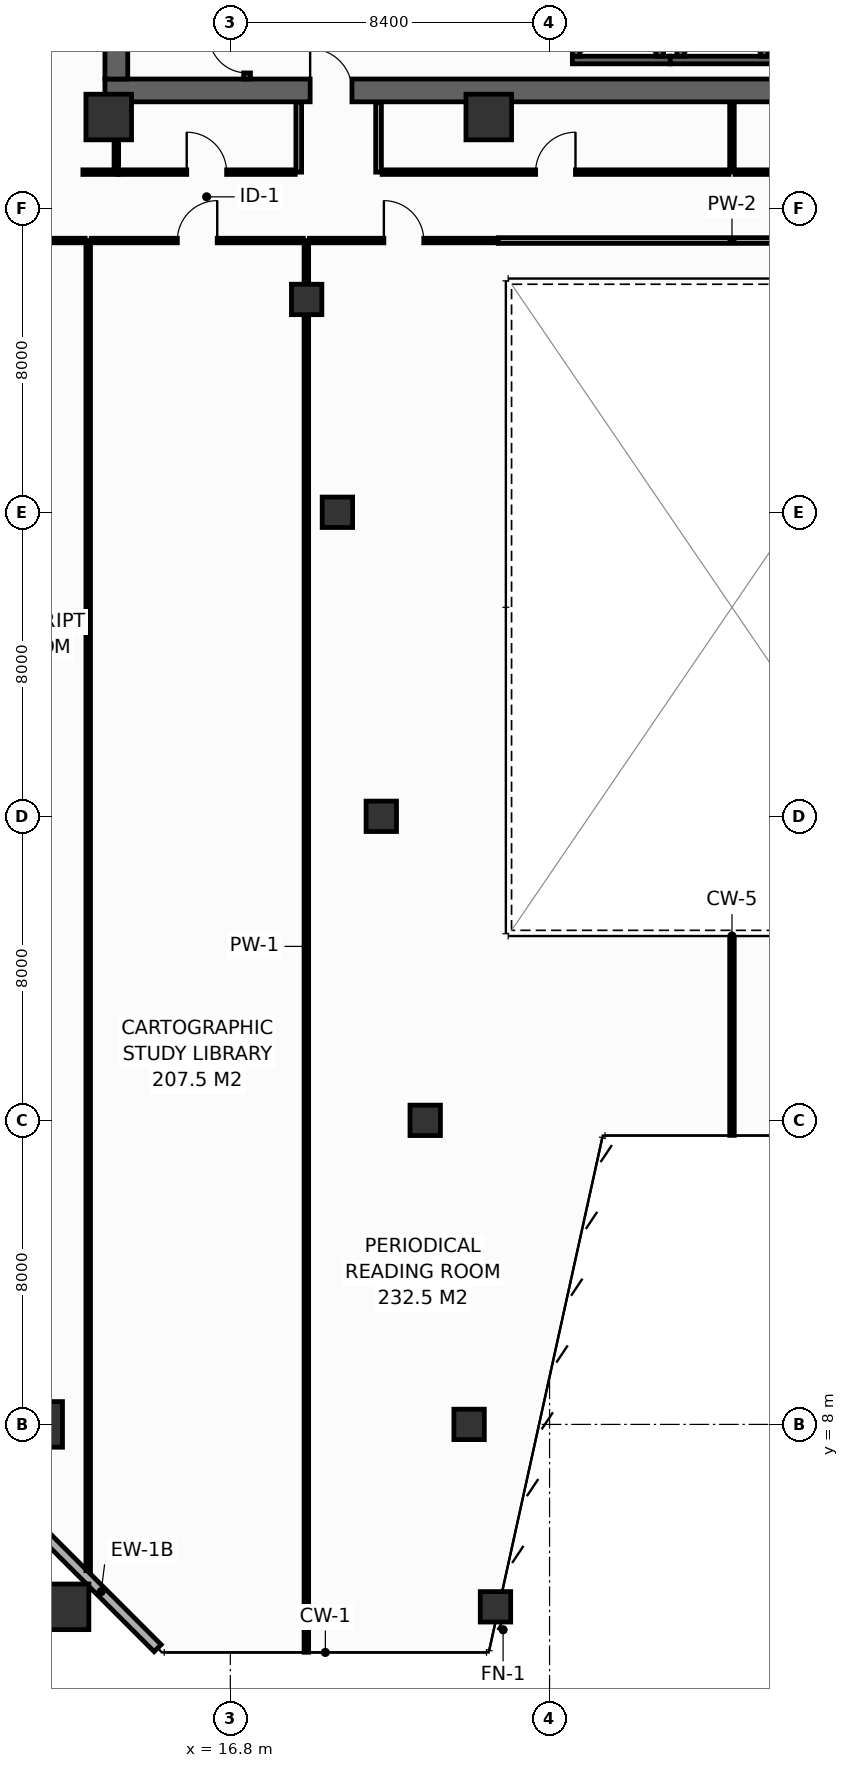
"""IFC4 building model, lengths in metres.
Left out: names, types, materials, properties, quantities, classifications, styles, units other than length and angle.
Written with IfcOpenShell. Run it as: python <this file> out.ifc"""

import sys

from ifc_helpers import new_model, si_unit, direction, frame, frame_2d, origin, origin_2d, place, context, subcontext, project, spatial, rectangle, hollow_rectangle, extrude, element, fill, save


model = new_model("IFC4")
c1 = context("Model", 3, precision=1e-05, world=origin(), true_north=direction((0.0, 1.0)))
c2 = subcontext(c1, "Body", "Model", "MODEL_VIEW")
j1 = project(units=[si_unit("LENGTHUNIT", "METRE"), si_unit("PLANEANGLEUNIT", "RADIAN")], contexts=[c1])
p1 = place(None, origin())
s1 = spatial("IfcSite", under=j1, at=p1, CompositionType="ELEMENT")
p2 = place(p1, origin())
s2 = spatial("IfcBuilding", under=s1, at=p2, CompositionType="ELEMENT")
p3 = place(p2, frame((0.0, 0.0, 51.6)))
s3 = spatial("IfcBuildingStorey", under=s2, at=p3, CompositionType="ELEMENT", Elevation=51.6)
p4 = place(p3, frame((13.5, 43.1, 0.0), z_axis=(0.0, 0.0, 1.0), x_axis=(1.0, 0.0, 0.0)))
e1 = element("IfcWall", 1, at=p4, inside=s3, PredefinedType="SHEAR", context=c2, shape_type="SweptSolid", body=[
    extrude(rectangle(XDim=32.9, YDim=0.6, at=frame_2d((16.45, 0.0))), origin(), (0.0, 0.0, 1.0), 4.15),
])
p5 = place(p4, frame((5.4, 0.0, 0.0)))
e2 = element("IfcOpeningElement", 2, at=p5, cuts=e1, PredefinedType="OPENING", context=c2, shape_type="SweptSolid", body=[
    extrude(rectangle(XDim=1.1, YDim=2.15, at=frame_2d((0.55, 1.075))), frame((0.0, 0.31, 0.0), z_axis=(0.0, -1.0, 0.0), x_axis=(1.0, 0.0, 0.0)), (0.0, 0.0, 1.0), 0.62),
])
p6 = place(p4, frame((25.6, 0.0, 0.0)))
e3 = element("IfcOpeningElement", 3, at=p6, cuts=e1, PredefinedType="OPENING", context=c2, shape_type="SweptSolid", body=[
    extrude(rectangle(XDim=1.1, YDim=2.15, at=frame_2d((0.55, 1.075))), frame((0.0, 0.31, 0.0), z_axis=(0.0, -1.0, 0.0), x_axis=(1.0, 0.0, 0.0)), (0.0, 0.0, 1.0), 0.62),
])
p7 = place(p3, frame((13.8, 43.4, 0.0), z_axis=(0.0, 0.0, 1.0), x_axis=(0.0, 1.0, 0.0)))
e4 = element("IfcWall", 4, at=p7, inside=s3, PredefinedType="SHEAR", context=c2, shape_type="SweptSolid", body=[
    extrude(rectangle(XDim=10.4, YDim=0.6, at=frame_2d((5.2, 0.0))), origin(), (0.0, 0.0, 1.0), 4.15),
])
for number, where, z_axis, x_axis in (
    (5, (13.6, 42.4, 0.0), (0.0, 0.0, 1.0), (1.0, 0.0, 0.0)),
    (6, (23.6, 42.4, 0.0), (0.0, 0.0, 1.0), (1.0, 0.0, 0.0)),
    (7, (12.477, 3.2, 0.0), (0.0, 0.0, 1.0), (1.0, 0.0, 0.0)),
):
    element("IfcColumn", number, at=place(p3, frame(where, z_axis=z_axis, x_axis=x_axis)), inside=s3, PredefinedType="COLUMN", context=c2, shape_type="SweptSolid", body=[
        extrude(hollow_rectangle(XDim=1.2, YDim=1.2, WallThickness=0.055, at=origin_2d()), origin(), (0.0, 0.0, 1.0), 4.4),
    ])
p8 = place(p3, frame((23.777, 3.2, 0.0), z_axis=(0.0, 0.0, 1.0), x_axis=(1.0, 0.0, 0.0)))
e8 = element("IfcColumn", 8, at=p8, inside=s3, PredefinedType="COLUMN", context=c2, shape_type="SweptSolid", body=[
    extrude(hollow_rectangle(XDim=0.8, YDim=0.8, WallThickness=0.036, at=origin_2d()), origin(), (0.0, 0.0, 1.0), 4.4),
])
p9 = place(p3, frame((11.783, 8.0, 0.0), z_axis=(0.0, 0.0, 1.0), x_axis=(1.0, 0.0, 0.0)))
e9 = element("IfcColumn", 9, at=p9, inside=s3, PredefinedType="COLUMN", context=c2, shape_type="SweptSolid", body=[
    extrude(hollow_rectangle(XDim=1.2, YDim=1.2, WallThickness=0.055, at=origin_2d()), origin(), (0.0, 0.0, 1.0), 4.4),
])
for number, where, z_axis, x_axis in (
    (10, (23.083, 8.0, 0.0), (0.0, 0.0, 1.0), (1.0, 0.0, 0.0)),
    (11, (21.928, 16.0, 0.0), (0.0, 0.0, 1.0), (1.0, 0.0, 0.0)),
    (12, (20.772, 24.0, 0.0), (0.0, 0.0, 1.0), (1.0, 0.0, 0.0)),
    (13, (19.617, 32.0, 0.0), (0.0, 0.0, 1.0), (1.0, 0.0, 0.0)),
    (14, (18.808, 37.6, 0.0), (0.0, 0.0, 1.0), (1.0, 0.0, 0.0)),
):
    element("IfcColumn", number, at=place(p3, frame(where, z_axis=z_axis, x_axis=x_axis)), inside=s3, PredefinedType="COLUMN", context=c2, shape_type="SweptSolid", body=[
        extrude(hollow_rectangle(XDim=0.8, YDim=0.8, WallThickness=0.036, at=origin_2d()), origin(), (0.0, 0.0, 1.0), 4.4),
    ])
p10 = place(p3, frame((25.8, 43.9, 0.0), z_axis=(0.0, 0.0, 1.0), x_axis=(1.0, 0.0, 0.0)))
e15 = element("IfcWall", 15, at=p10, inside=s3, PredefinedType="SHEAR", context=c2, shape_type="SweptSolid", body=[
    extrude(rectangle(XDim=2.575, YDim=0.2, at=frame_2d((1.288, 0.0))), origin(), (0.0, 0.0, 1.0), 4.15),
])
for number, where, z_axis, x_axis in (
    (16, (25.9, 44.0, 0.0), (0.0, 0.0, 1.0), (0.0, 1.0, 0.0)),
    (17, (28.1, 44.0, 0.0), (0.0, 0.0, 1.0), (0.0, 1.0, 0.0)),
):
    element("IfcWall", number, at=place(p3, frame(where, z_axis=z_axis, x_axis=x_axis)), inside=s3, PredefinedType="SHEAR", context=c2, shape_type="SweptSolid", body=[
        extrude(rectangle(XDim=2.3, YDim=0.2, at=frame_2d((1.15, 0.0))), origin(), (0.0, 0.0, 1.0), 4.15),
    ])
p11 = place(p3, frame((28.375, 43.9, 0.0), z_axis=(0.0, 0.0, 1.0), x_axis=(1.0, 0.0, 0.0)))
e18 = element("IfcWall", 18, at=p11, inside=s3, PredefinedType="SHEAR", context=c2, shape_type="SweptSolid", body=[
    extrude(rectangle(XDim=2.75, YDim=0.2, at=frame_2d((1.375, 0.0))), origin(), (0.0, 0.0, 1.0), 4.15),
])
for number, where, z_axis, x_axis in (
    (19, (28.65, 44.0, 0.0), (0.0, 0.0, 1.0), (0.0, 1.0, 0.0)),
    (20, (30.85, 44.0, 0.0), (0.0, 0.0, 1.0), (0.0, 1.0, 0.0)),
):
    element("IfcWall", number, at=place(p3, frame(where, z_axis=z_axis, x_axis=x_axis)), inside=s3, PredefinedType="SHEAR", context=c2, shape_type="SweptSolid", body=[
        extrude(rectangle(XDim=2.3, YDim=0.2, at=frame_2d((1.15, 0.0))), origin(), (0.0, 0.0, 1.0), 4.15),
    ])
p12 = place(p3, frame((17.24, 43.4, 0.0), z_axis=(0.0, 0.0, 1.0), x_axis=(0.0, 1.0, 0.0)))
e21 = element("IfcWall", 21, at=p12, inside=s3, PredefinedType="SHEAR", context=c2, shape_type="SweptSolid", body=[
    extrude(rectangle(XDim=10.4, YDim=0.18, at=frame_2d((5.2, 0.0))), origin(), (0.0, 0.0, 1.0), 4.15),
])
p13 = place(p12, frame((0.16, 0.0, 0.0)))
e22 = element("IfcOpeningElement", 22, at=p13, cuts=e21, PredefinedType="OPENING", context=c2, shape_type="SweptSolid", body=[
    extrude(rectangle(XDim=1.0, YDim=2.15, at=frame_2d((0.5, 1.075))), frame((0.0, 0.1, 0.0), z_axis=(0.0, -1.0, 0.0), x_axis=(1.0, 0.0, 0.0)), (0.0, 0.0, 1.0), 0.2),
])
p14 = place(p3, frame((11.913, 5.087, 0.0), z_axis=(0.0, 0.0, 1.0), x_axis=(0.707106781187, -0.707106781187, 0.0)))
e23 = element("IfcWall", 23, at=p14, inside=s3, PredefinedType="STANDARD", context=c2, shape_type="SweptSolid", body=[
    extrude(rectangle(XDim=4.206, YDim=0.26, at=frame_2d((2.103, 0.0))), origin(), (0.0, 0.0, 1.0), 4.15),
])
p15 = place(p3, frame((12.92, 40.95, 0.0), z_axis=(0.0, 0.0, 1.0), x_axis=(1.0, 0.0, 0.0)))
e24 = element("IfcWall", 24, at=p15, inside=s3, PredefinedType="PARTITIONING", context=c2, shape_type="SweptSolid", body=[
    extrude(rectangle(XDim=0.93, YDim=0.12, at=frame_2d((0.465, 0.0))), origin(), (0.0, 0.0, 1.0), 4.15),
])
p16 = place(p3, frame((13.8, 41.03, 0.0), z_axis=(0.0, 0.0, 1.0), x_axis=(0.0, 1.0, 0.0)))
e25 = element("IfcWall", 25, at=p16, inside=s3, PredefinedType="PARTITIONING", context=c2, shape_type="SweptSolid", body=[
    extrude(rectangle(XDim=1.75, YDim=0.12, at=frame_2d((0.875, 0.0))), origin(), (0.0, 0.0, 1.0), 4.15),
])
for number, where, z_axis, x_axis in (
    (26, (18.6, 40.95, 0.0), (0.0, 0.0, 1.0), (0.0, 1.0, 0.0)),
    (27, (20.7, 40.95, 0.0), (0.0, 0.0, 1.0), (0.0, 1.0, 0.0)),
):
    element("IfcWall", number, at=place(p3, frame(where, z_axis=z_axis, x_axis=x_axis)), inside=s3, PredefinedType="PARTITIONING", context=c2, shape_type="SweptSolid", body=[
        extrude(rectangle(XDim=1.83, YDim=0.15, at=frame_2d((0.915, 0.0))), origin(), (0.0, 0.0, 1.0), 4.15),
    ])
p17 = place(p3, frame((13.85, 40.95, 0.0), z_axis=(0.0, 0.0, 1.0), x_axis=(1.0, 0.0, 0.0)))
e28 = element("IfcWall", 28, at=p17, inside=s3, PredefinedType="PARTITIONING", context=c2, shape_type="SweptSolid", body=[
    extrude(rectangle(XDim=4.655, YDim=0.12, at=frame_2d((2.327, 0.0))), origin(), (0.0, 0.0, 1.0), 4.15),
])
p18 = place(p17, frame((1.802, 0.0, 0.0)))
e29 = element("IfcOpeningElement", 29, at=p18, cuts=e28, PredefinedType="OPENING", context=c2, shape_type="SweptSolid", body=[
    extrude(rectangle(XDim=1.05, YDim=2.15, at=frame_2d((0.525, 1.075))), frame((0.0, 0.07, 0.0), z_axis=(0.0, -1.0, 0.0), x_axis=(1.0, 0.0, 0.0)), (0.0, 0.0, 1.0), 0.14),
])
p19 = place(p3, frame((30.0, 40.95, 0.0), z_axis=(0.0, 0.0, 1.0), x_axis=(0.0, 1.0, 0.0)))
e30 = element("IfcWall", 30, at=p19, inside=s3, PredefinedType="PARTITIONING", context=c2, shape_type="SweptSolid", body=[
    extrude(rectangle(XDim=1.83, YDim=0.12, at=frame_2d((0.915, 0.0))), origin(), (0.0, 0.0, 1.0), 3.335),
])
p20 = place(p3, frame((20.795, 40.95, 0.0), z_axis=(0.0, 0.0, 1.0), x_axis=(1.0, 0.0, 0.0)))
e31 = element("IfcWall", 31, at=p20, inside=s3, PredefinedType="PARTITIONING", context=c2, shape_type="SweptSolid", body=[
    extrude(rectangle(XDim=9.125, YDim=0.12, at=frame_2d((4.562, 0.0))), origin(), (0.0, 0.0, 1.0), 3.335),
])
p21 = place(p20, frame((4.037, 0.0, 0.0)))
e32 = element("IfcOpeningElement", 32, at=p21, cuts=e31, PredefinedType="OPENING", context=c2, shape_type="SweptSolid", body=[
    extrude(rectangle(XDim=1.05, YDim=2.15, at=frame_2d((0.525, 1.075))), frame((0.0, 0.07, 0.0), z_axis=(0.0, -1.0, 0.0), x_axis=(1.0, 0.0, 0.0)), (0.0, 0.0, 1.0), 0.14),
])
p22 = place(p3, frame((30.08, 40.95, 0.0), z_axis=(0.0, 0.0, 1.0), x_axis=(1.0, 0.0, 0.0)))
e33 = element("IfcWall", 33, at=p22, inside=s3, PredefinedType="PARTITIONING", context=c2, shape_type="SweptSolid", body=[
    extrude(rectangle(XDim=8.625, YDim=0.12, at=frame_2d((4.312, 0.0))), origin(), (0.0, 0.0, 1.0), 3.335),
])
p23 = place(p22, frame((3.862, 0.0, 0.0)))
e34 = element("IfcOpeningElement", 34, at=p23, cuts=e33, PredefinedType="OPENING", context=c2, shape_type="SweptSolid", body=[
    extrude(rectangle(XDim=0.9, YDim=2.1, at=frame_2d((0.45, 1.05))), frame((0.0, 0.07, 0.0), z_axis=(0.0, -1.0, 0.0), x_axis=(1.0, 0.0, 0.0)), (0.0, 0.0, 1.0), 0.14),
])
p24 = place(p3, frame((13.06, 4.152, 0.0), z_axis=(0.0, 0.0, 1.0), x_axis=(0.0, 1.0, 0.0)))
e35 = element("IfcWall", 35, at=p24, inside=s3, PredefinedType="PARTITIONING", context=c2, shape_type="SweptSolid", body=[
    extrude(rectangle(XDim=34.998, YDim=0.12, at=frame_2d((17.499, 0.0))), origin(), (0.0, 0.0, 1.0), 3.335),
])
p25 = place(p3, frame((18.8, 2.005, 0.0), z_axis=(0.0, 0.0, 1.0), x_axis=(0.0, 1.0, 0.0)))
e36 = element("IfcWall", 36, at=p25, inside=s3, PredefinedType="PARTITIONING", context=c2, shape_type="SweptSolid", body=[
    extrude(rectangle(XDim=37.145, YDim=0.12, at=frame_2d((18.573, 0.0))), origin(), (0.0, 0.0, 1.0), 3.335),
])
p26 = place(p3, frame((30.0, 15.605, 0.0), z_axis=(0.0, 0.0, 1.0), x_axis=(0.0, 1.0, 0.0)))
e37 = element("IfcWall", 37, at=p26, inside=s3, PredefinedType="PARTITIONING", context=c2, shape_type="SweptSolid", body=[
    extrude(rectangle(XDim=5.175, YDim=0.12, at=frame_2d((2.587, 0.0))), origin(), (0.0, 0.0, 1.0), 4.15),
])
p27 = place(p3, frame((6.334, 39.15, 0.0), z_axis=(0.0, 0.0, 1.0), x_axis=(1.0, 0.0, 0.0)))
e38 = element("IfcWall", 38, at=p27, inside=s3, PredefinedType="PARTITIONING", context=c2, shape_type="SweptSolid", body=[
    extrude(rectangle(XDim=6.646, YDim=0.12, at=frame_2d((3.323, 0.0))), origin(), (0.0, 0.0, 1.0), 3.635),
])
p28 = place(p27, frame((2.798, 0.0, 0.0)))
e39 = element("IfcOpeningElement", 39, at=p28, cuts=e38, PredefinedType="OPENING", context=c2, shape_type="SweptSolid", body=[
    extrude(rectangle(XDim=1.05, YDim=2.15, at=frame_2d((0.525, 1.075))), frame((0.0, 0.07, 0.0), z_axis=(0.0, -1.0, 0.0), x_axis=(1.0, 0.0, 0.0)), (0.0, 0.0, 1.0), 0.14),
])
p29 = place(p3, frame((13.14, 39.15, 0.0), z_axis=(0.0, 0.0, 1.0), x_axis=(1.0, 0.0, 0.0)))
e40 = element("IfcWall", 40, at=p29, inside=s3, PredefinedType="PARTITIONING", context=c2, shape_type="SweptSolid", body=[
    extrude(rectangle(XDim=5.58, YDim=0.12, at=frame_2d((2.79, 0.0))), origin(), (0.0, 0.0, 1.0), 4.15),
])
p30 = place(p29, frame((2.265, 0.0, 0.0)))
e41 = element("IfcOpeningElement", 41, at=p30, cuts=e40, PredefinedType="OPENING", context=c2, shape_type="SweptSolid", body=[
    extrude(rectangle(XDim=1.05, YDim=2.15, at=frame_2d((0.525, 1.075))), frame((0.0, 0.07, 0.0), z_axis=(0.0, -1.0, 0.0), x_axis=(1.0, 0.0, 0.0)), (0.0, 0.0, 1.0), 0.14),
])
p31 = place(p3, frame((18.88, 39.15, 0.0), z_axis=(0.0, 0.0, 1.0), x_axis=(1.0, 0.0, 0.0)))
e42 = element("IfcWall", 42, at=p31, inside=s3, PredefinedType="PARTITIONING", context=c2, shape_type="SweptSolid", body=[
    extrude(rectangle(XDim=4.97, YDim=0.12, at=frame_2d((2.485, 0.0))), origin(), (0.0, 0.0, 1.0), 3.335),
])
p32 = place(p31, frame((1.96, 0.0, 0.0)))
e43 = element("IfcOpeningElement", 43, at=p32, cuts=e42, PredefinedType="OPENING", context=c2, shape_type="SweptSolid", body=[
    extrude(rectangle(XDim=1.05, YDim=2.15, at=frame_2d((0.525, 1.075))), frame((0.0, 0.07, 0.0), z_axis=(0.0, -1.0, 0.0), x_axis=(1.0, 0.0, 0.0)), (0.0, 0.0, 1.0), 0.14),
])
p33 = place(p3, frame((23.85, 39.15, 0.0), z_axis=(0.0, 0.0, 1.0), x_axis=(1.0, 0.0, 0.0)))
e44 = element("IfcWall", 44, at=p33, inside=s3, PredefinedType="PARTITIONING", context=c2, shape_type="SweptSolid", body=[
    extrude(rectangle(XDim=12.3, YDim=0.15, at=frame_2d((6.15, 0.0))), origin(), (0.0, 0.0, 1.0), 4.15),
])
p34 = place(p13, origin())
e45 = element("IfcDoor", 45, at=p34, inside=s3, OperationType="SINGLE_SWING_RIGHT", PredefinedType="DOOR", context=c2, shape_type="SweptSolid", body=[
    extrude(rectangle(XDim=1.0, YDim=2.15, at=frame_2d((0.5, 1.075))), frame((0.0, 0.025, 0.0), z_axis=(0.0, -1.0, 0.0), x_axis=(1.0, 0.0, 0.0)), (0.0, 0.0, 1.0), 0.05),
])
fill(e22, e45)
p35 = place(p5, origin())
e46 = element("IfcDoor", 46, at=p35, inside=s3, OperationType="SINGLE_SWING_LEFT", PredefinedType="DOOR", context=c2, shape_type="SweptSolid", body=[
    extrude(rectangle(XDim=1.1, YDim=2.15, at=frame_2d((0.55, 1.075))), frame((0.0, 0.025, 0.0), z_axis=(0.0, -1.0, 0.0), x_axis=(1.0, 0.0, 0.0)), (0.0, 0.0, 1.0), 0.05),
])
fill(e2, e46)
p36 = place(p18, origin())
e47 = element("IfcDoor", 47, at=p36, inside=s3, OperationType="SINGLE_SWING_LEFT", PredefinedType="DOOR", context=c2, shape_type="SweptSolid", body=[
    extrude(rectangle(XDim=1.05, YDim=2.15, at=frame_2d((0.525, 1.075))), frame((0.0, 0.025, 0.0), z_axis=(0.0, -1.0, 0.0), x_axis=(1.0, 0.0, 0.0)), (0.0, 0.0, 1.0), 0.05),
])
fill(e29, e47)
p37 = place(p21, origin())
e48 = element("IfcDoor", 48, at=p37, inside=s3, OperationType="SINGLE_SWING_RIGHT", PredefinedType="DOOR", context=c2, shape_type="SweptSolid", body=[
    extrude(rectangle(XDim=1.05, YDim=2.15, at=frame_2d((0.525, 1.075))), frame((0.0, 0.025, 0.0), z_axis=(0.0, -1.0, 0.0), x_axis=(1.0, 0.0, 0.0)), (0.0, 0.0, 1.0), 0.05),
])
fill(e32, e48)
p38 = place(p30, origin())
e49 = element("IfcDoor", 49, at=p38, inside=s3, OperationType="SINGLE_SWING_RIGHT", PredefinedType="DOOR", context=c2, shape_type="SweptSolid", body=[
    extrude(rectangle(XDim=1.05, YDim=2.15, at=frame_2d((0.525, 1.075))), frame((0.0, 0.025, 0.0), z_axis=(0.0, -1.0, 0.0), x_axis=(1.0, 0.0, 0.0)), (0.0, 0.0, 1.0), 0.05),
])
fill(e41, e49)
p39 = place(p32, origin())
e50 = element("IfcDoor", 50, at=p39, inside=s3, OperationType="SINGLE_SWING_LEFT", PredefinedType="DOOR", context=c2, shape_type="SweptSolid", body=[
    extrude(rectangle(XDim=1.05, YDim=2.15, at=frame_2d((0.525, 1.075))), frame((0.0, 0.025, 0.0), z_axis=(0.0, -1.0, 0.0), x_axis=(1.0, 0.0, 0.0)), (0.0, 0.0, 1.0), 0.05),
])
fill(e43, e50)
save(model, sys.argv[1])
